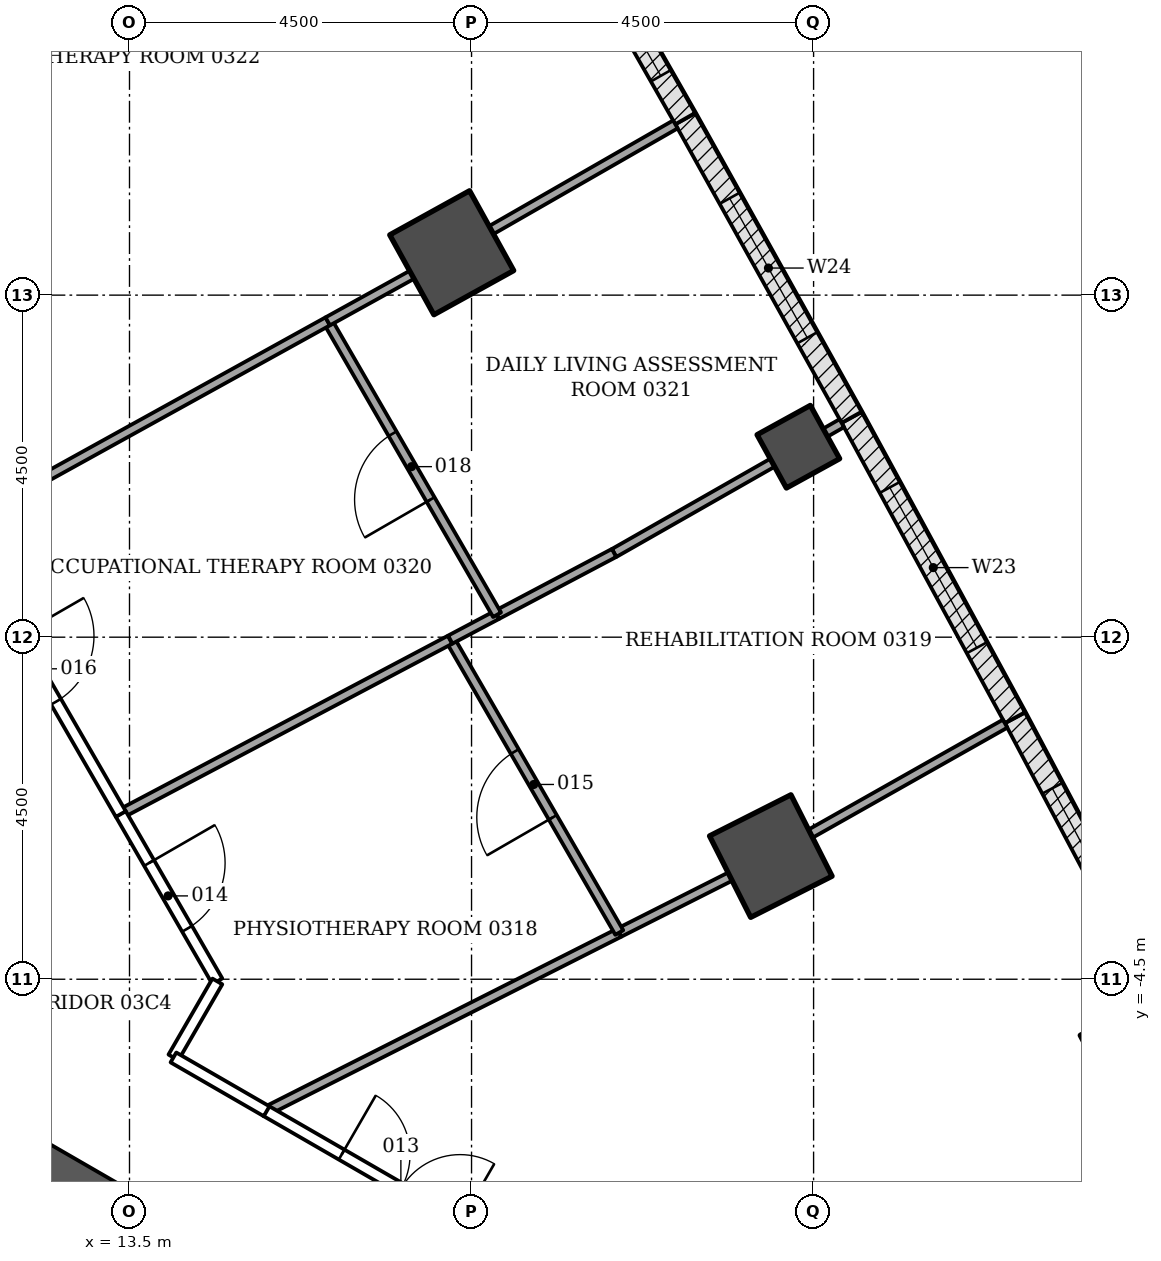
"""IFC4 building model, lengths in metres.
Left out: names, types, materials, properties, quantities, classifications, styles, units other than length and angle.
Written with IfcOpenShell. Run it as: python <this file> out.ifc"""

import sys

from ifc_helpers import new_model, si_unit, direction, frame, frame_2d, origin, origin_2d, place, context, subcontext, project, spatial, rectangle, extrude, element, fill, save


model = new_model("IFC4")
c1 = context("Model", 3, precision=1e-05, world=origin(), true_north=direction((0.0, 1.0)))
c2 = subcontext(c1, "Body", "Model", "MODEL_VIEW")
j1 = project(units=[si_unit("LENGTHUNIT", "METRE"), si_unit("PLANEANGLEUNIT", "RADIAN")], contexts=[c1])
p1 = place(None, origin())
s1 = spatial("IfcSite", under=j1, at=p1, CompositionType="ELEMENT")
p2 = place(p1, origin())
s2 = spatial("IfcBuilding", under=s1, at=p2, CompositionType="ELEMENT")
p3 = place(p2, frame((0.0, 0.0, 15.0)))
s3 = spatial("IfcBuildingStorey", under=s2, at=p3, CompositionType="ELEMENT", Elevation=15.0)
for number, where, z_axis, x_axis in (
    (1, (21.937, -2.88, -0.25), (0.0, 0.0, 1.0), (0.893, 0.451, 0.0)),
    (2, (17.739, 5.058, -0.25), (0.0, 0.0, 1.0), (0.875, 0.484, 0.0)),
):
    element("IfcColumn", number, at=place(p3, frame(where, z_axis=z_axis, x_axis=x_axis)), inside=s3, PredefinedType="COLUMN", context=c2, shape_type="SweptSolid", body=[
        extrude(rectangle(XDim=1.2, YDim=1.2, at=origin_2d()), origin(), (0.0, 0.0, 1.0), 4.5),
    ])
for number, where, z_axis, x_axis in (
    (3, (26.548, -5.406, -0.25), (0.0, 0.0, 1.0), (0.886, 0.464, 0.0)),
    (4, (22.3, 2.506, -0.25), (0.0, 0.0, 1.0), (0.876, 0.482, 0.0)),
):
    element("IfcColumn", number, at=place(p3, frame(where, z_axis=z_axis, x_axis=x_axis)), inside=s3, PredefinedType="COLUMN", context=c2, shape_type="SweptSolid", body=[
        extrude(rectangle(XDim=0.8, YDim=0.8, at=origin_2d()), origin(), (0.0, 0.0, 1.0), 4.5),
    ])
p4 = place(p3, frame((9.922, -5.728, -0.25), z_axis=(0.0, 0.0, 1.0), x_axis=(0.866028046028, -0.499995423472, 0.0)))
e5 = element("IfcWall", 5, at=p4, inside=s3, PredefinedType="SHEAR", context=c2, shape_type="SweptSolid", body=[
    extrude(rectangle(XDim=14.633, YDim=0.9, at=frame_2d((7.316, 0.0))), origin(), (0.0, 0.0, 1.0), 4.5),
])
p5 = place(p4, frame((7.35, 0.0, 0.25)))
e6 = element("IfcOpeningElement", 6, at=p5, cuts=e5, PredefinedType="OPENING", context=c2, shape_type="SweptSolid", body=[
    extrude(rectangle(XDim=1.5, YDim=2.1, at=frame_2d((0.75, 1.05))), frame((0.0, 0.46, 0.0), z_axis=(0.0, -1.0, 0.0), x_axis=(1.0, 0.0, 0.0)), (0.0, 0.0, 1.0), 0.92),
])
p6 = place(p3, frame((25.15, -1.062, 0.0), z_axis=(0.0, 0.0, 1.0), x_axis=(0.468566202388, -0.883428386447, 0.0)))
e7 = element("IfcWall", 7, at=p6, inside=s3, PredefinedType="NOTDEFINED", context=c2, shape_type="SweptSolid", body=[
    extrude(rectangle(XDim=4.496, YDim=0.3, at=frame_2d((2.248, 0.0))), origin(), (0.0, 0.0, 1.0), 4.25),
])
p7 = place(p6, frame((1.048, 0.0, 0.9)))
e8 = element("IfcOpeningElement", 8, at=p7, cuts=e7, PredefinedType="OPENING", context=c2, shape_type="SweptSolid", body=[
    extrude(rectangle(XDim=2.4, YDim=2.4, at=frame_2d((1.2, 1.2))), frame((0.0, 0.16, 0.0), z_axis=(0.0, -1.0, 0.0), x_axis=(1.0, 0.0, 0.0)), (0.0, 0.0, 1.0), 0.32),
])
p8 = place(p3, frame((23.001, 2.89, 0.0), z_axis=(0.0, 0.0, 1.0), x_axis=(0.477577109439, -0.878589838628, 0.0)))
e9 = element("IfcWall", 9, at=p8, inside=s3, PredefinedType="NOTDEFINED", context=c2, shape_type="SweptSolid", body=[
    extrude(rectangle(XDim=4.496, YDim=0.3, at=frame_2d((2.248, 0.0))), origin(), (0.0, 0.0, 1.0), 4.25),
])
p9 = place(p8, frame((1.048, 0.0, 0.9)))
e10 = element("IfcOpeningElement", 10, at=p9, cuts=e9, PredefinedType="OPENING", context=c2, shape_type="SweptSolid", body=[
    extrude(rectangle(XDim=2.4, YDim=2.4, at=frame_2d((1.2, 1.2))), frame((0.0, 0.16, 0.0), z_axis=(0.0, -1.0, 0.0), x_axis=(1.0, 0.0, 0.0)), (0.0, 0.0, 1.0), 0.32),
])
p10 = place(p3, frame((20.812, 6.82, 0.0), z_axis=(0.0, 0.0, 1.0), x_axis=(0.486606252415, -0.873621402617, 0.0)))
e11 = element("IfcWall", 11, at=p10, inside=s3, PredefinedType="NOTDEFINED", context=c2, shape_type="SweptSolid", body=[
    extrude(rectangle(XDim=4.496, YDim=0.3, at=frame_2d((2.248, 0.0))), origin(), (0.0, 0.0, 1.0), 4.25),
])
p11 = place(p10, frame((1.198, 0.0, 0.8)))
e12 = element("IfcOpeningElement", 12, at=p11, cuts=e11, PredefinedType="OPENING", context=c2, shape_type="SweptSolid", body=[
    extrude(rectangle(XDim=2.1, YDim=3.0, at=frame_2d((1.05, 1.5))), frame((0.0, 0.16, 0.0), z_axis=(0.0, -1.0, 0.0), x_axis=(1.0, 0.0, 0.0)), (0.0, 0.0, 1.0), 0.32),
])
p12 = place(p3, frame((18.583, 10.728, 0.0), z_axis=(0.0, 0.0, 1.0), x_axis=(0.495524760411, -0.868593812907, 0.0)))
e13 = element("IfcWall", 13, at=p12, inside=s3, PredefinedType="NOTDEFINED", context=c2, shape_type="SweptSolid", body=[
    extrude(rectangle(XDim=4.496, YDim=0.3, at=frame_2d((2.248, 0.0))), origin(), (0.0, 0.0, 1.0), 4.25),
])
p13 = place(p12, frame((0.648, 0.0, 0.8)))
e14 = element("IfcOpeningElement", 14, at=p13, cuts=e13, PredefinedType="OPENING", context=c2, shape_type="SweptSolid", body=[
    extrude(rectangle(XDim=3.2, YDim=2.7, at=frame_2d((1.6, 1.35))), frame((0.0, 0.16, 0.0), z_axis=(0.0, -1.0, 0.0), x_axis=(1.0, 0.0, 0.0)), (0.0, 0.0, 1.0), 0.32),
])
p14 = place(p3, frame((9.413, -6.61, -0.25), z_axis=(0.0, 0.0, 1.0), x_axis=(0.866018442252, -0.500012057535, 0.0)))
e15 = element("IfcWall", 15, at=p14, inside=s3, PredefinedType="SHEAR", context=c2, shape_type="SweptSolid", body=[
    extrude(rectangle(XDim=7.2, YDim=1.136, at=frame_2d((3.6, 0.0))), origin(), (0.0, 0.0, 1.0), 4.5),
])
p15 = place(p3, frame((19.942, -3.888, 0.0), z_axis=(0.0, 0.0, 1.0), x_axis=(-0.89243804137, -0.451169970539, 0.0)))
e16 = element("IfcWall", 16, at=p15, inside=s3, PredefinedType="PARTITIONING", context=c2, shape_type="SweptSolid", body=[
    extrude(rectangle(XDim=5.202, YDim=0.12, at=frame_2d((2.601, 0.0))), origin(), (0.0, 0.0, 1.0), 3.638),
])
p16 = place(p3, frame((21.401, -3.151, 0.0), z_axis=(0.0, 0.0, 1.0), x_axis=(-0.892653768212, -0.450742997834, 0.0)))
e17 = element("IfcWall", 17, at=p16, inside=s3, PredefinedType="PARTITIONING", context=c2, shape_type="SweptSolid", body=[
    extrude(rectangle(XDim=1.631, YDim=0.12, at=frame_2d((0.815, 0.0))), origin(), (0.0, 0.0, 1.0), 3.638),
])
p17 = place(p3, frame((25.02, -1.138, 0.0), z_axis=(0.0, 0.0, 1.0), x_axis=(-0.870620069476, -0.491955988505, 0.0)))
e18 = element("IfcWall", 18, at=p17, inside=s3, PredefinedType="PARTITIONING", context=c2, shape_type="SweptSolid", body=[
    extrude(rectangle(XDim=2.939, YDim=0.12, at=frame_2d((1.47, 0.0))), origin(), (0.0, 0.0, 1.0), 3.633),
])
p18 = place(p3, frame((15.295, -6.232, 0.0), z_axis=(0.0, 0.0, 1.0), x_axis=(0.865991915229, -0.500057999394, 0.0)))
e19 = element("IfcWall", 19, at=p18, inside=s3, PredefinedType="PARTITIONING", context=c2, shape_type="SweptSolid", body=[
    extrude(rectangle(XDim=4.094, YDim=0.15, at=frame_2d((2.047, 0.0))), origin(), (0.0, 0.0, 1.0), 3.638),
])
p19 = place(p18, frame((1.15, 0.0, 0.0)))
e20 = element("IfcOpeningElement", 20, at=p19, cuts=e19, PredefinedType="OPENING", context=c2, shape_type="SweptSolid", body=[
    extrude(rectangle(XDim=1.8, YDim=2.1, at=frame_2d((0.9, 1.05))), frame((0.0, 0.085, 0.0), z_axis=(0.0, -1.0, 0.0), x_axis=(1.0, 0.0, 0.0)), (0.0, 0.0, 1.0), 0.17),
])
p20 = place(p3, frame((19.944, -3.886, 0.0), z_axis=(0.0, 0.0, 1.0), x_axis=(-0.500092923031, 0.865971748, 0.0)))
e21 = element("IfcWall", 21, at=p20, inside=s3, PredefinedType="PARTITIONING", context=c2, shape_type="SweptSolid", body=[
    extrude(rectangle(XDim=4.449, YDim=0.12, at=frame_2d((2.225, 0.0))), origin(), (0.0, 0.0, 1.0), 3.638),
])
p21 = place(p20, frame((1.75, 0.0, 0.0)))
e22 = element("IfcOpeningElement", 22, at=p21, cuts=e21, PredefinedType="OPENING", context=c2, shape_type="SweptSolid", body=[
    extrude(rectangle(XDim=1.0, YDim=2.1, at=frame_2d((0.5, 1.05))), frame((0.0, 0.07, 0.0), z_axis=(0.0, -1.0, 0.0), x_axis=(1.0, 0.0, 0.0)), (0.0, 0.0, 1.0), 0.14),
])
p22 = place(p3, frame((17.717, -0.034, 0.0), z_axis=(0.0, 0.0, 1.0), x_axis=(-0.884117284138, -0.467265051003, 0.0)))
e23 = element("IfcWall", 23, at=p22, inside=s3, PredefinedType="PARTITIONING", context=c2, shape_type="SweptSolid", body=[
    extrude(rectangle(XDim=4.901, YDim=0.12, at=frame_2d((2.45, 0.0))), origin(), (0.0, 0.0, 1.0), 3.638),
])
p23 = place(p3, frame((13.383, -2.321, 0.0), z_axis=(0.0, 0.0, 1.0), x_axis=(0.499788837842, -0.866147283993, 0.0)))
e24 = element("IfcWall", 24, at=p23, inside=s3, PredefinedType="PARTITIONING", context=c2, shape_type="SweptSolid", body=[
    extrude(rectangle(XDim=2.547, YDim=0.15, at=frame_2d((1.273, 0.0))), origin(), (0.0, 0.0, 1.0), 3.638),
])
p24 = place(p23, frame((0.75, 0.0, 0.0)))
e25 = element("IfcOpeningElement", 25, at=p24, cuts=e24, PredefinedType="OPENING", context=c2, shape_type="SweptSolid", body=[
    extrude(rectangle(XDim=1.0, YDim=2.1, at=frame_2d((0.5, 1.05))), frame((0.0, 0.085, 0.0), z_axis=(0.0, -1.0, 0.0), x_axis=(1.0, 0.0, 0.0)), (0.0, 0.0, 1.0), 0.17),
])
p25 = place(p3, frame((14.656, -4.529, 0.0), z_axis=(0.0, 0.0, 1.0), x_axis=(-0.500502949238, -0.865734831114, 0.0)))
e26 = element("IfcWall", 26, at=p25, inside=s3, PredefinedType="PARTITIONING", context=c2, shape_type="SweptSolid", body=[
    extrude(rectangle(XDim=1.155, YDim=0.15, at=frame_2d((0.578, 0.0))), origin(), (0.0, 0.0, 1.0), 4.25),
])
p26 = place(p3, frame((14.078, -5.529, 0.0), z_axis=(0.0, 0.0, 1.0), x_axis=(0.865984561414, -0.500070734389, 0.0)))
e27 = element("IfcWall", 27, at=p26, inside=s3, PredefinedType="PARTITIONING", context=c2, shape_type="SweptSolid", body=[
    extrude(rectangle(XDim=1.416, YDim=0.15, at=frame_2d((0.708, 0.0))), origin(), (0.0, 0.0, 1.0), 3.638),
])
p27 = place(p3, frame((18.336, 0.294, 0.0), z_axis=(0.0, 0.0, 1.0), x_axis=(-0.883890154601, -0.467694552672, 0.0)))
e28 = element("IfcWall", 28, at=p27, inside=s3, PredefinedType="PARTITIONING", context=c2, shape_type="SweptSolid", body=[
    extrude(rectangle(XDim=0.697, YDim=0.12, at=frame_2d((0.348, 0.0))), origin(), (0.0, 0.0, 1.0), 3.638),
])
p28 = place(p3, frame((21.959, 2.295, 0.0), z_axis=(0.0, 0.0, 1.0), x_axis=(-0.868831589773, -0.49510773435, 0.0)))
e29 = element("IfcWall", 29, at=p28, inside=s3, PredefinedType="PARTITIONING", context=c2, shape_type="SweptSolid", body=[
    extrude(rectangle(XDim=2.397, YDim=0.12, at=frame_2d((1.199, 0.0))), origin(), (0.0, 0.0, 1.0), 3.638),
])
p29 = place(p3, frame((19.875, 1.108, 0.0), z_axis=(0.0, 0.0, 1.0), x_axis=(-0.884094940295, -0.467307325584, 0.0)))
e30 = element("IfcWall", 30, at=p29, inside=s3, PredefinedType="PARTITIONING", context=c2, shape_type="SweptSolid", body=[
    extrude(rectangle(XDim=1.74, YDim=0.12, at=frame_2d((0.87, 0.0))), origin(), (0.0, 0.0, 1.0), 3.638),
])
p30 = place(p3, frame((22.871, 2.815, 0.0), z_axis=(0.0, 0.0, 1.0), x_axis=(-0.867276603101, -0.497826569916, 0.0)))
e31 = element("IfcWall", 31, at=p30, inside=s3, PredefinedType="PARTITIONING", context=c2, shape_type="SweptSolid", body=[
    extrude(rectangle(XDim=0.249, YDim=0.12, at=frame_2d((0.125, 0.0))), origin(), (0.0, 0.0, 1.0), 4.25),
])
p31 = place(p3, frame((18.336, 0.295, 0.0), z_axis=(0.0, 0.0, 1.0), x_axis=(-0.499992780121, 0.866029572143, 0.0)))
e32 = element("IfcWall", 32, at=p31, inside=s3, PredefinedType="PARTITIONING", context=c2, shape_type="SweptSolid", body=[
    extrude(rectangle(XDim=4.456, YDim=0.12, at=frame_2d((2.228, 0.0))), origin(), (0.0, 0.0, 1.0), 3.638),
])
p32 = place(p31, frame((1.75, 0.0, 0.0)))
e33 = element("IfcOpeningElement", 33, at=p32, cuts=e32, PredefinedType="OPENING", context=c2, shape_type="SweptSolid", body=[
    extrude(rectangle(XDim=1.0, YDim=2.1, at=frame_2d((0.5, 1.05))), frame((0.0, 0.07, 0.0), z_axis=(0.0, -1.0, 0.0), x_axis=(1.0, 0.0, 0.0)), (0.0, 0.0, 1.0), 0.14),
])
p33 = place(p3, frame((11.208, 1.446, 0.0), z_axis=(0.0, 0.0, 1.0), x_axis=(0.49994237214, -0.866058672688, 0.0)))
e34 = element("IfcWall", 34, at=p33, inside=s3, PredefinedType="PARTITIONING", context=c2, shape_type="SweptSolid", body=[
    extrude(rectangle(XDim=4.356, YDim=0.15, at=frame_2d((2.178, 0.0))), origin(), (0.0, 0.0, 1.0), 3.638),
])
p34 = place(p33, frame((1.65, 0.0, 0.0)))
e35 = element("IfcOpeningElement", 35, at=p34, cuts=e34, PredefinedType="OPENING", context=c2, shape_type="SweptSolid", body=[
    extrude(rectangle(XDim=1.0, YDim=2.1, at=frame_2d((0.5, 1.05))), frame((0.0, 0.085, 0.0), z_axis=(0.0, -1.0, 0.0), x_axis=(1.0, 0.0, 0.0)), (0.0, 0.0, 1.0), 0.17),
])
p35 = place(p3, frame((16.108, 4.155, 0.0), z_axis=(0.0, 0.0, 1.0), x_axis=(-0.87515505143, -0.483842573526, 0.0)))
e36 = element("IfcWall", 36, at=p35, inside=s3, PredefinedType="PARTITIONING", context=c2, shape_type="SweptSolid", body=[
    extrude(rectangle(XDim=5.599, YDim=0.12, at=frame_2d((2.799, 0.0))), origin(), (0.0, 0.0, 1.0), 3.638),
])
p36 = place(p3, frame((17.214, 4.767, 0.0), z_axis=(0.0, 0.0, 1.0), x_axis=(-0.874994011196, -0.484133742235, 0.0)))
e37 = element("IfcWall", 37, at=p36, inside=s3, PredefinedType="PARTITIONING", context=c2, shape_type="SweptSolid", body=[
    extrude(rectangle(XDim=1.264, YDim=0.12, at=frame_2d((0.632, 0.0))), origin(), (0.0, 0.0, 1.0), 3.638),
])
p37 = place(p3, frame((20.682, 6.746, 0.0), z_axis=(0.0, 0.0, 1.0), x_axis=(-0.867283853893, -0.49781393791, 0.0)))
e38 = element("IfcWall", 38, at=p37, inside=s3, PredefinedType="PARTITIONING", context=c2, shape_type="SweptSolid", body=[
    extrude(rectangle(XDim=2.792, YDim=0.12, at=frame_2d((1.396, 0.0))), origin(), (0.0, 0.0, 1.0), 3.633),
])
p38 = place(p7, origin())
e39 = element("IfcWindow", 39, at=p38, inside=s3, PartitioningType="DOUBLE_PANEL_VERTICAL", PredefinedType="WINDOW", context=c2, shape_type="SweptSolid", body=[
    extrude(rectangle(XDim=2.4, YDim=2.4, at=frame_2d((1.2, 1.2))), frame((0.0, 0.03, 0.0), z_axis=(0.0, -1.0, 0.0), x_axis=(1.0, 0.0, 0.0)), (0.0, 0.0, 1.0), 0.06),
])
fill(e8, e39)
p39 = place(p9, origin())
e40 = element("IfcWindow", 40, at=p39, inside=s3, PartitioningType="DOUBLE_PANEL_VERTICAL", PredefinedType="WINDOW", context=c2, shape_type="SweptSolid", body=[
    extrude(rectangle(XDim=2.4, YDim=2.4, at=frame_2d((1.2, 1.2))), frame((0.0, 0.03, 0.0), z_axis=(0.0, -1.0, 0.0), x_axis=(1.0, 0.0, 0.0)), (0.0, 0.0, 1.0), 0.06),
])
fill(e10, e40)
p40 = place(p11, origin())
e41 = element("IfcWindow", 41, at=p40, inside=s3, PartitioningType="DOUBLE_PANEL_HORIZONTAL", PredefinedType="WINDOW", context=c2, shape_type="SweptSolid", body=[
    extrude(rectangle(XDim=2.1, YDim=3.0, at=frame_2d((1.05, 1.5))), frame((0.0, 0.03, 0.0), z_axis=(0.0, -1.0, 0.0), x_axis=(1.0, 0.0, 0.0)), (0.0, 0.0, 1.0), 0.06),
])
fill(e12, e41)
p41 = place(p13, origin())
e42 = element("IfcWindow", 42, at=p41, inside=s3, PartitioningType="TRIPLE_PANEL_VERTICAL", PredefinedType="WINDOW", context=c2, shape_type="SweptSolid", body=[
    extrude(rectangle(XDim=3.2, YDim=2.7, at=frame_2d((1.6, 1.35))), frame((0.0, 0.03, 0.0), z_axis=(0.0, -1.0, 0.0), x_axis=(1.0, 0.0, 0.0)), (0.0, 0.0, 1.0), 0.06),
])
fill(e14, e42)
p42 = place(p19, origin())
e43 = element("IfcDoor", 43, at=p42, inside=s3, OperationType="DOUBLE_DOOR_SINGLE_SWING", PredefinedType="DOOR", context=c2, shape_type="SweptSolid", body=[
    extrude(rectangle(XDim=1.8, YDim=2.1, at=frame_2d((0.9, 1.05))), frame((0.0, 0.025, 0.0), z_axis=(0.0, -1.0, 0.0), x_axis=(1.0, 0.0, 0.0)), (0.0, 0.0, 1.0), 0.05),
])
fill(e20, e43)
p43 = place(p24, origin())
e44 = element("IfcDoor", 44, at=p43, inside=s3, OperationType="SINGLE_SWING_LEFT", PredefinedType="DOOR", context=c2, shape_type="SweptSolid", body=[
    extrude(rectangle(XDim=1.0, YDim=2.1, at=frame_2d((0.5, 1.05))), frame((0.0, 0.025, 0.0), z_axis=(0.0, -1.0, 0.0), x_axis=(1.0, 0.0, 0.0)), (0.0, 0.0, 1.0), 0.05),
])
fill(e25, e44)
p44 = place(p21, origin())
e45 = element("IfcDoor", 45, at=p44, inside=s3, OperationType="SINGLE_SWING_LEFT", PredefinedType="DOOR", context=c2, shape_type="SweptSolid", body=[
    extrude(rectangle(XDim=1.0, YDim=2.1, at=frame_2d((0.5, 1.05))), frame((0.0, 0.025, 0.0), z_axis=(0.0, -1.0, 0.0), x_axis=(1.0, 0.0, 0.0)), (0.0, 0.0, 1.0), 0.05),
])
fill(e22, e45)
p45 = place(p34, origin())
e46 = element("IfcDoor", 46, at=p45, inside=s3, OperationType="SINGLE_SWING_LEFT", PredefinedType="DOOR", context=c2, shape_type="SweptSolid", body=[
    extrude(rectangle(XDim=1.0, YDim=2.1, at=frame_2d((0.5, 1.05))), frame((0.0, 0.025, 0.0), z_axis=(0.0, -1.0, 0.0), x_axis=(1.0, 0.0, 0.0)), (0.0, 0.0, 1.0), 0.05),
])
fill(e35, e46)
p46 = place(p32, origin())
e47 = element("IfcDoor", 47, at=p46, inside=s3, OperationType="SINGLE_SWING_LEFT", PredefinedType="DOOR", context=c2, shape_type="SweptSolid", body=[
    extrude(rectangle(XDim=1.0, YDim=2.1, at=frame_2d((0.5, 1.05))), frame((0.0, 0.025, 0.0), z_axis=(0.0, -1.0, 0.0), x_axis=(1.0, 0.0, 0.0)), (0.0, 0.0, 1.0), 0.05),
])
fill(e33, e47)
save(model, sys.argv[1])
